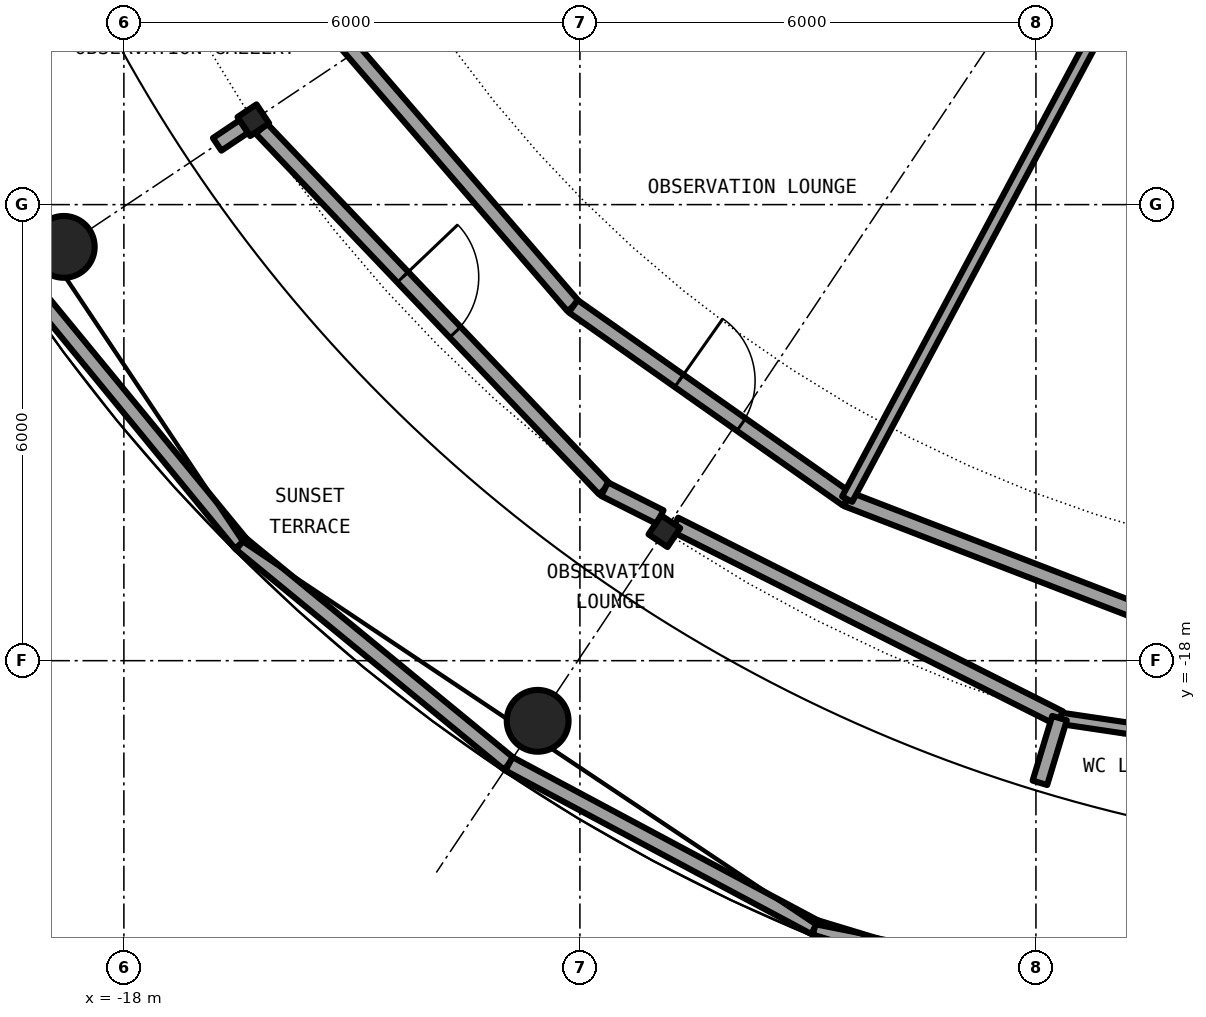
"""IFC4 building model, lengths in metres.
Left out: names, types, materials, properties, quantities, classifications, styles, units other than length and angle.
Written with IfcOpenShell. Run it as: python <this file> out.ifc"""

import sys

from ifc_helpers import new_model, si_unit, direction, frame, frame_2d, origin, origin_2d, place, context, subcontext, project, spatial, rectangle, hollow_circle, i_section, extrude, element, fill, save


model = new_model("IFC4")
c1 = context("Model", 3, precision=1e-05, world=origin(), true_north=direction((0.0, 1.0)))
c2 = subcontext(c1, "Body", "Model", "MODEL_VIEW")
j1 = project(units=[si_unit("LENGTHUNIT", "METRE"), si_unit("PLANEANGLEUNIT", "RADIAN")], contexts=[c1])
p1 = place(None, origin())
s1 = spatial("IfcSite", under=j1, at=p1, CompositionType="ELEMENT")
p2 = place(p1, origin())
s2 = spatial("IfcBuilding", under=s1, at=p2, CompositionType="ELEMENT")
p3 = place(p2, frame((0.0, 0.0, 255.4)))
s3 = spatial("IfcBuildingStorey", under=s2, at=p3, CompositionType="ELEMENT", Elevation=255.4)
for number, where, z_axis, x_axis in (
    (1, (-18.791, -12.556, 0.0), (0.0, 0.0, 1.0), (1.0, 0.0, 0.0)),
    (2, (-12.556, -18.791, 0.0), (0.0, 0.0, 1.0), (1.0, 0.0, 0.0)),
):
    element("IfcColumn", number, at=place(p3, frame(where, z_axis=z_axis, x_axis=x_axis)), inside=s3, PredefinedType="COLUMN", context=c2, shape_type="SweptSolid", body=[
        extrude(hollow_circle(Radius=0.406, WallThickness=0.03, at=origin_2d()), origin(), (0.0, 0.0, 1.0), 6.1),
    ])
for number, where, z_axis, x_axis in (
    (3, (-16.297, -10.889, 0.0), (0.0, 0.0, 1.0), (-0.831, -0.556, 0.0)),
    (4, (-10.889, -16.297, 0.0), (0.0, 0.0, 1.0), (-0.556, -0.831, 0.0)),
):
    element("IfcColumn", number, at=place(p3, frame(where, z_axis=z_axis, x_axis=x_axis)), inside=s3, PredefinedType="COLUMN", context=c2, shape_type="SweptSolid", body=[
        extrude(i_section(OverallWidth=0.3, OverallDepth=0.3, WebThickness=0.011, FlangeThickness=0.019, FilletRadius=0.027, at=origin_2d()), origin(), (0.0, 0.0, 1.0), 6.1),
    ])
for number, where, z_axis, x_axis in (
    (5, (-19.357, -12.934, 6.1), (0.0, 0.0, 1.0), (0.635, -0.773, 0.0)),
    (6, (-16.461, -16.461, 6.1), (0.0, 0.0, 1.0), (0.773, -0.635, 0.0)),
):
    element("IfcWall", number, at=place(p3, frame(where, z_axis=z_axis, x_axis=x_axis)), inside=s3, PredefinedType="PARAPET", context=c2, shape_type="SweptSolid", body=[
        extrude(rectangle(XDim=4.563, YDim=0.2, at=frame_2d((2.282, 0.0))), origin(), (0.0, 0.0, 1.0), 1.1),
    ])
p4 = place(p3, frame((-12.934, -19.357, 6.1), z_axis=(0.0, 0.0, 1.0), x_axis=(0.881954289711, -0.471334945511, 0.0)))
e7 = element("IfcWall", 7, at=p4, inside=s3, PredefinedType="PARAPET", context=c2, shape_type="SweptSolid", body=[
    extrude(rectangle(XDim=4.564, YDim=0.2, at=frame_2d((2.282, 0.0))), origin(), (0.0, 0.0, 1.0), 1.1),
])
p5 = place(p3, frame((-8.909, -21.508, 6.1), z_axis=(0.0, 0.0, 1.0), x_axis=(0.956924910545, -0.29033552242, 0.0)))
e8 = element("IfcWall", 8, at=p5, inside=s3, PredefinedType="PARAPET", context=c2, shape_type="SweptSolid", body=[
    extrude(rectangle(XDim=4.563, YDim=0.2, at=frame_2d((2.282, 0.0))), origin(), (0.0, 0.0, 1.0), 1.1),
])
p6 = place(p3, frame((-5.69, -18.756, 0.0), z_axis=(0.0, 0.0, 1.0), x_axis=(0.989177240103, -0.146725552177, 0.0)))
e9 = element("IfcWall", 9, at=p6, inside=s3, PredefinedType="PARTITIONING", context=c2, shape_type="SweptSolid", body=[
    extrude(rectangle(XDim=5.752, YDim=0.15, at=frame_2d((2.876, 0.0))), origin(), (0.0, 0.0, 1.0), 5.5),
])
p7 = place(p6, frame((2.55, 0.0, 0.0)))
e10 = element("IfcOpeningElement", 10, at=p7, cuts=e9, PredefinedType="OPENING", context=c2, shape_type="SweptSolid", body=[
    extrude(rectangle(XDim=1.0, YDim=2.3, at=frame_2d((0.5, 1.15))), frame((0.0, 0.085, 0.0), z_axis=(0.0, -1.0, 0.0), x_axis=(1.0, 0.0, 0.0)), (0.0, 0.0, 1.0), 0.17),
])
p8 = place(p6, frame((3.9, 0.0, 0.0)))
e11 = element("IfcOpeningElement", 11, at=p8, cuts=e9, PredefinedType="OPENING", context=c2, shape_type="SweptSolid", body=[
    extrude(rectangle(XDim=0.9, YDim=2.3, at=frame_2d((0.45, 1.15))), frame((0.0, 0.085, 0.0), z_axis=(0.0, -1.0, 0.0), x_axis=(1.0, 0.0, 0.0)), (0.0, 0.0, 1.0), 0.17),
])
p9 = place(p3, frame((-16.192, -10.999, 0.0), z_axis=(0.0, 0.0, 1.0), x_axis=(0.689484820725, -0.724300132535, 0.0)))
e12 = element("IfcWall", 12, at=p9, inside=s3, PredefinedType="PARTITIONING", context=c2, shape_type="SweptSolid", body=[
    extrude(rectangle(XDim=6.55, YDim=0.2, at=frame_2d((3.275, 0.0))), origin(), (0.0, 0.0, 1.0), 5.5),
])
p10 = place(p9, frame((2.699, 0.0, 0.0)))
e13 = element("IfcOpeningElement", 13, at=p10, cuts=e12, PredefinedType="OPENING", context=c2, shape_type="SweptSolid", body=[
    extrude(rectangle(XDim=1.0, YDim=2.3, at=frame_2d((0.5, 1.15))), frame((0.0, 0.11, 0.0), z_axis=(0.0, -1.0, 0.0), x_axis=(1.0, 0.0, 0.0)), (0.0, 0.0, 1.0), 0.22),
])
p11 = place(p3, frame((-11.676, -15.743, 0.0), z_axis=(0.0, 0.0, 1.0), x_axis=(0.893110817984, -0.449836711263, 0.0)))
e14 = element("IfcWall", 14, at=p11, inside=s3, PredefinedType="PARTITIONING", context=c2, shape_type="SweptSolid", body=[
    extrude(rectangle(XDim=0.818, YDim=0.2, at=frame_2d((0.409, 0.0))), origin(), (0.0, 0.0, 1.0), 5.75),
])
p12 = place(p3, frame((-10.752, -16.208, 0.0), z_axis=(0.0, 0.0, 1.0), x_axis=(0.89321770158, -0.449624440599, 0.0)))
e15 = element("IfcWall", 15, at=p12, inside=s3, PredefinedType="PARTITIONING", context=c2, shape_type="SweptSolid", body=[
    extrude(rectangle(XDim=5.667, YDim=0.2, at=frame_2d((2.833, 0.0))), origin(), (0.0, 0.0, 1.0), 5.5),
])
p13 = place(p3, frame((-8.485, -15.875, 0.0), z_axis=(0.0, 0.0, 1.0), x_axis=(0.932983851272, -0.35991823136, 0.0)))
e16 = element("IfcWall", 16, at=p13, inside=s3, PredefinedType="PARTITIONING", context=c2, shape_type="SweptSolid", body=[
    extrude(rectangle(XDim=4.406, YDim=0.2, at=frame_2d((2.203, 0.0))), origin(), (0.0, 0.0, 1.0), 5.75),
])
p14 = place(p3, frame((-15.613, -9.25, 0.0), z_axis=(0.0, 0.0, 1.0), x_axis=(0.653146301984, -0.757231740093, 0.0)))
e17 = element("IfcWall", 17, at=p14, inside=s3, PredefinedType="PARTITIONING", context=c2, shape_type="SweptSolid", body=[
    extrude(rectangle(XDim=5.397, YDim=0.2, at=frame_2d((2.699, 0.0))), origin(), (0.0, 0.0, 1.0), 5.75),
])
p15 = place(p3, frame((-12.088, -13.337, 0.0), z_axis=(0.0, 0.0, 1.0), x_axis=(0.817507922666, -0.575917352038, 0.0)))
e18 = element("IfcWall", 18, at=p15, inside=s3, PredefinedType="PARTITIONING", context=c2, shape_type="SweptSolid", body=[
    extrude(rectangle(XDim=4.407, YDim=0.2, at=frame_2d((2.204, 0.0))), origin(), (0.0, 0.0, 1.0), 5.75),
])
p16 = place(p15, frame((1.704, 0.0, 0.0)))
e19 = element("IfcOpeningElement", 19, at=p16, cuts=e18, PredefinedType="OPENING", context=c2, shape_type="SweptSolid", body=[
    extrude(rectangle(XDim=1.0, YDim=2.3, at=frame_2d((0.5, 1.15))), frame((0.0, 0.11, 0.0), z_axis=(0.0, -1.0, 0.0), x_axis=(1.0, 0.0, 0.0)), (0.0, 0.0, 1.0), 0.22),
])
p17 = place(p3, frame((-16.773, -11.207, 0.0), z_axis=(0.0, 0.0, 1.0), x_axis=(0.830713836596, 0.556699669201, 0.0)))
e20 = element("IfcWall", 20, at=p17, inside=s3, PredefinedType="PARTITIONING", context=c2, shape_type="SweptSolid", body=[
    extrude(rectangle(XDim=0.422, YDim=0.2, at=frame_2d((0.211, 0.0))), origin(), (0.0, 0.0, 1.0), 5.75),
])
p18 = place(p3, frame((-8.484, -15.875, 0.0), z_axis=(0.0, 0.0, 1.0), x_axis=(0.471365806418, 0.881937796299, 0.0)))
e21 = element("IfcWall", 21, at=p18, inside=s3, PredefinedType="PARTITIONING", context=c2, shape_type="SweptSolid", body=[
    extrude(rectangle(XDim=10.281, YDim=0.15, at=frame_2d((5.14, 0.0))), origin(), (0.0, 0.0, 1.0), 5.75),
])
p19 = place(p3, frame((-5.948, -19.607, 0.0), z_axis=(0.0, 0.0, 1.0), x_axis=(0.290243641717, 0.956952782766, 0.0)))
e22 = element("IfcWall", 22, at=p19, inside=s3, PredefinedType="PARTITIONING", context=c2, shape_type="SweptSolid", body=[
    extrude(rectangle(XDim=0.889, YDim=0.2, at=frame_2d((0.445, 0.0))), origin(), (0.0, 0.0, 1.0), 5.75),
])
p20 = place(p3, frame((0.0, 0.0, 5.75)))
p21 = place(p20, frame((-11.075, -19.182, 0.0)))
p22 = place(p21, frame((0.0, 0.0, 0.3)))
e23 = element("IfcWindow", 23, at=p22, inside=s3, PartitioningType="SINGLE_PANEL", PredefinedType="SKYLIGHT", context=c2, shape_type="SweptSolid", body=[
    extrude(rectangle(XDim=1.0, YDim=1.0, at=origin_2d()), origin(), (0.0, 0.0, 1.0), 0.05),
])
p23 = place(p10, origin())
e24 = element("IfcDoor", 24, at=p23, inside=s3, OperationType="SINGLE_SWING_LEFT", PredefinedType="DOOR", context=c2, shape_type="SweptSolid", body=[
    extrude(rectangle(XDim=1.0, YDim=2.3, at=frame_2d((0.5, 1.15))), frame((0.0, 0.025, 0.0), z_axis=(0.0, -1.0, 0.0), x_axis=(1.0, 0.0, 0.0)), (0.0, 0.0, 1.0), 0.05),
])
fill(e13, e24)
p24 = place(p16, origin())
e25 = element("IfcDoor", 25, at=p24, inside=s3, OperationType="SINGLE_SWING_RIGHT", PredefinedType="DOOR", context=c2, shape_type="SweptSolid", body=[
    extrude(rectangle(XDim=1.0, YDim=2.3, at=frame_2d((0.5, 1.15))), frame((0.0, 0.025, 0.0), z_axis=(0.0, -1.0, 0.0), x_axis=(1.0, 0.0, 0.0)), (0.0, 0.0, 1.0), 0.05),
])
fill(e19, e25)
save(model, sys.argv[1])
